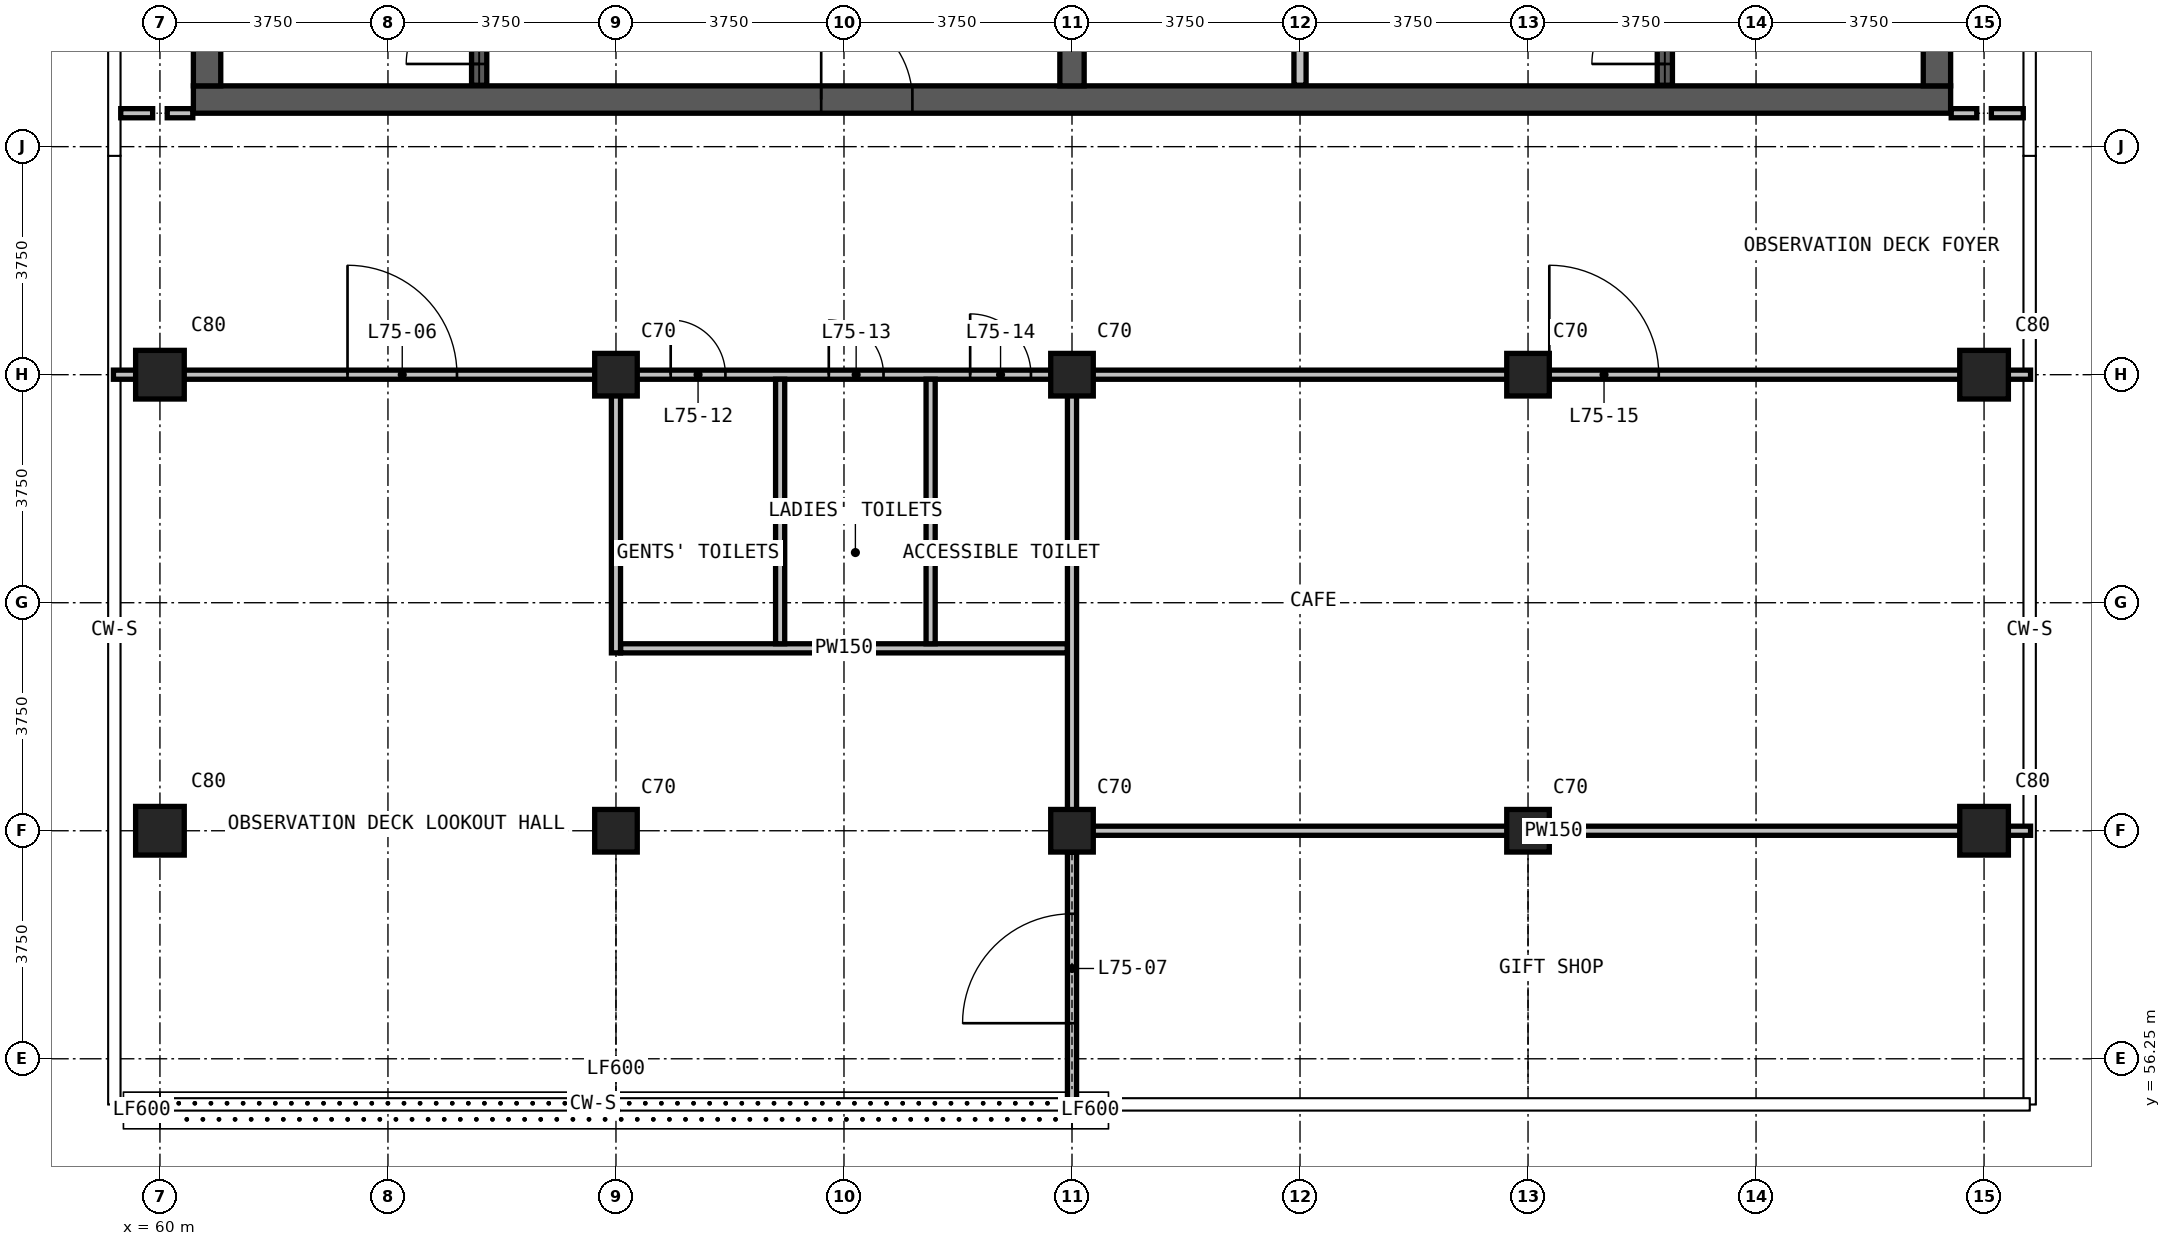
"""IFC4 building model, lengths in metres.
Left out: names, types, materials, properties, quantities, classifications, styles, units other than length and angle.
Written with IfcOpenShell. Run it as: python <this file> out.ifc"""

import sys

from ifc_helpers import new_model, si_unit, direction, frame, frame_2d, origin, origin_2d, place, context, subcontext, project, spatial, rectangle, extrude, element, fill, save


model = new_model("IFC4")
c1 = context("Model", 3, precision=1e-05, world=origin(), true_north=direction((0.0, 1.0)))
c2 = subcontext(c1, "Body", "Model", "MODEL_VIEW")
j1 = project(units=[si_unit("LENGTHUNIT", "METRE"), si_unit("PLANEANGLEUNIT", "RADIAN")], contexts=[c1])
p1 = place(None, origin())
s1 = spatial("IfcSite", under=j1, at=p1, CompositionType="ELEMENT")
p2 = place(p1, origin())
s2 = spatial("IfcBuilding", under=s1, at=p2, CompositionType="ELEMENT")
p3 = place(p2, frame((0.0, 0.0, 287.7)))
s3 = spatial("IfcBuildingStorey", under=s2, at=p3, CompositionType="ELEMENT", Elevation=287.7)
for number, where, z_axis, x_axis in (
    (1, (60.0, 60.0, 0.0), (0.0, 0.0, 1.0), (1.0, 0.0, 0.0)),
    (2, (60.0, 67.5, 0.0), (0.0, 0.0, 1.0), (1.0, 0.0, 0.0)),
):
    element("IfcColumn", number, at=place(p3, frame(where, z_axis=z_axis, x_axis=x_axis)), inside=s3, PredefinedType="COLUMN", context=c2, shape_type="SweptSolid", body=[
        extrude(rectangle(XDim=0.8, YDim=0.8, at=origin_2d()), origin(), (0.0, 0.0, 1.0), 5.0),
    ])
for number, where, z_axis, x_axis in (
    (3, (67.5, 60.0, 0.0), (0.0, 0.0, 1.0), (1.0, 0.0, 0.0)),
    (4, (67.5, 67.5, 0.0), (0.0, 0.0, 1.0), (1.0, 0.0, 0.0)),
    (5, (75.0, 60.0, 0.0), (0.0, 0.0, 1.0), (1.0, 0.0, 0.0)),
    (6, (75.0, 67.5, 0.0), (0.0, 0.0, 1.0), (1.0, 0.0, 0.0)),
    (7, (82.5, 60.0, 0.0), (0.0, 0.0, 1.0), (1.0, 0.0, 0.0)),
    (8, (82.5, 67.5, 0.0), (0.0, 0.0, 1.0), (1.0, 0.0, 0.0)),
):
    element("IfcColumn", number, at=place(p3, frame(where, z_axis=z_axis, x_axis=x_axis)), inside=s3, PredefinedType="COLUMN", context=c2, shape_type="SweptSolid", body=[
        extrude(rectangle(XDim=0.7, YDim=0.7, at=origin_2d()), origin(), (0.0, 0.0, 1.0), 5.0),
    ])
for number, where, z_axis, x_axis in (
    (9, (90.0, 60.0, 0.0), (0.0, 0.0, 1.0), (1.0, 0.0, 0.0)),
    (10, (90.0, 67.5, 0.0), (0.0, 0.0, 1.0), (1.0, 0.0, 0.0)),
):
    element("IfcColumn", number, at=place(p3, frame(where, z_axis=z_axis, x_axis=x_axis)), inside=s3, PredefinedType="COLUMN", context=c2, shape_type="SweptSolid", body=[
        extrude(rectangle(XDim=0.8, YDim=0.8, at=origin_2d()), origin(), (0.0, 0.0, 1.0), 5.0),
    ])
p4 = place(p3, frame((60.55, 72.025, 0.0), z_axis=(0.0, 0.0, 1.0), x_axis=(1.0, 0.0, 0.0)))
e11 = element("IfcWall", 11, at=p4, inside=s3, PredefinedType="SHEAR", context=c2, shape_type="SweptSolid", body=[
    extrude(rectangle(XDim=28.9, YDim=0.45, at=frame_2d((14.45, 0.0))), origin(), (0.0, 0.0, 1.0), 5.0),
])
p5 = place(p4, frame((10.325, 0.0, 0.0)))
e12 = element("IfcOpeningElement", 12, at=p5, cuts=e11, PredefinedType="OPENING", context=c2, shape_type="SweptSolid", body=[
    extrude(rectangle(XDim=1.5, YDim=2.2, at=frame_2d((0.75, 1.1))), frame((0.0, 0.235, 0.0), z_axis=(0.0, -1.0, 0.0), x_axis=(1.0, 0.0, 0.0)), (0.0, 0.0, 1.0), 0.47),
])
p6 = place(p3, frame((89.225, 72.25, 0.0), z_axis=(0.0, 0.0, 1.0), x_axis=(0.0, 1.0, 0.0)))
e13 = element("IfcWall", 13, at=p6, inside=s3, PredefinedType="SHEAR", context=c2, shape_type="SweptSolid", body=[
    extrude(rectangle(XDim=20.5, YDim=0.45, at=frame_2d((10.25, 0.0))), origin(), (0.0, 0.0, 1.0), 5.0),
])
p7 = place(p6, frame((7.875, 0.0, 0.0)))
e14 = element("IfcOpeningElement", 14, at=p7, cuts=e13, PredefinedType="OPENING", context=c2, shape_type="SweptSolid", body=[
    extrude(rectangle(XDim=1.5, YDim=2.2, at=frame_2d((0.75, 1.1))), frame((0.0, 0.235, 0.0), z_axis=(0.0, -1.0, 0.0), x_axis=(1.0, 0.0, 0.0)), (0.0, 0.0, 1.0), 0.47),
])
p8 = place(p3, frame((60.775, 92.75, 0.0), z_axis=(0.0, 0.0, 1.0), x_axis=(0.0, -1.0, 0.0)))
e15 = element("IfcWall", 15, at=p8, inside=s3, PredefinedType="SHEAR", context=c2, shape_type="SweptSolid", body=[
    extrude(rectangle(XDim=20.5, YDim=0.45, at=frame_2d((10.25, 0.0))), origin(), (0.0, 0.0, 1.0), 5.0),
])
p9 = place(p8, frame((8.025, 0.0, 0.0)))
e16 = element("IfcOpeningElement", 16, at=p9, cuts=e15, PredefinedType="OPENING", context=c2, shape_type="SweptSolid", body=[
    extrude(rectangle(XDim=1.2, YDim=2.2, at=frame_2d((0.6, 1.1))), frame((0.0, 0.235, 0.0), z_axis=(0.0, -1.0, 0.0), x_axis=(1.0, 0.0, 0.0)), (0.0, 0.0, 1.0), 0.47),
])
p10 = place(p3, frame((75.0, 72.25, 0.0), z_axis=(0.0, 0.0, 1.0), x_axis=(0.0, 1.0, 0.0)))
e17 = element("IfcWall", 17, at=p10, inside=s3, PredefinedType="SHEAR", context=c2, shape_type="SweptSolid", body=[
    extrude(rectangle(XDim=6.35, YDim=0.4, at=frame_2d((3.175, 0.0))), origin(), (0.0, 0.0, 1.0), 5.0),
])
p11 = place(p3, frame((78.75, 72.26, 0.0), z_axis=(0.0, 0.0, 1.0), x_axis=(0.0, 1.0, 0.0)))
e18 = element("IfcWall", 18, at=p11, inside=s3, PredefinedType="PARTITIONING", context=c2, shape_type="SweptSolid", body=[
    extrude(rectangle(XDim=10.24, YDim=0.2, at=frame_2d((5.12, 0.0))), origin(), (0.0, 0.0, 1.0), 4.65),
])
p12 = place(p3, frame((75.075, 60.0, 0.0), z_axis=(0.0, 0.0, 1.0), x_axis=(1.0, 0.0, 0.0)))
e19 = element("IfcWall", 19, at=p12, inside=s3, PredefinedType="PARTITIONING", context=c2, shape_type="SweptSolid", body=[
    extrude(rectangle(XDim=15.69, YDim=0.15, at=frame_2d((7.845, 0.0))), origin(), (0.0, 0.0, 1.0), 4.65),
])
p13 = place(p3, frame((67.575, 63.0, 0.0), z_axis=(0.0, 0.0, 1.0), x_axis=(1.0, 0.0, 0.0)))
e20 = element("IfcWall", 20, at=p13, inside=s3, PredefinedType="PARTITIONING", context=c2, shape_type="SweptSolid", body=[
    extrude(rectangle(XDim=7.35, YDim=0.15, at=frame_2d((3.675, 0.0))), origin(), (0.0, 0.0, 1.0), 4.65),
])
p14 = place(p3, frame((59.235, 67.5, 0.0), z_axis=(0.0, 0.0, 1.0), x_axis=(1.0, 0.0, 0.0)))
e21 = element("IfcWall", 21, at=p14, inside=s3, PredefinedType="PARTITIONING", context=c2, shape_type="SweptSolid", body=[
    extrude(rectangle(XDim=31.53, YDim=0.15, at=frame_2d((15.765, 0.0))), origin(), (0.0, 0.0, 1.0), 4.65),
])
p15 = place(p14, frame((3.85, 0.0, 0.0)))
e22 = element("IfcOpeningElement", 22, at=p15, cuts=e21, PredefinedType="OPENING", context=c2, shape_type="SweptSolid", body=[
    extrude(rectangle(XDim=1.8, YDim=2.2, at=frame_2d((0.9, 1.1))), frame((0.0, 0.085, 0.0), z_axis=(0.0, -1.0, 0.0), x_axis=(1.0, 0.0, 0.0)), (0.0, 0.0, 1.0), 0.17),
])
p16 = place(p14, frame((9.165, 0.0, 0.0)))
e23 = element("IfcOpeningElement", 23, at=p16, cuts=e21, PredefinedType="OPENING", context=c2, shape_type="SweptSolid", body=[
    extrude(rectangle(XDim=0.9, YDim=2.2, at=frame_2d((0.45, 1.1))), frame((0.0, 0.085, 0.0), z_axis=(0.0, -1.0, 0.0), x_axis=(1.0, 0.0, 0.0)), (0.0, 0.0, 1.0), 0.17),
])
p17 = place(p14, frame((11.765, 0.0, 0.0)))
e24 = element("IfcOpeningElement", 24, at=p17, cuts=e21, PredefinedType="OPENING", context=c2, shape_type="SweptSolid", body=[
    extrude(rectangle(XDim=0.9, YDim=2.2, at=frame_2d((0.45, 1.1))), frame((0.0, 0.085, 0.0), z_axis=(0.0, -1.0, 0.0), x_axis=(1.0, 0.0, 0.0)), (0.0, 0.0, 1.0), 0.17),
])
p18 = place(p14, frame((14.09, 0.0, 0.0)))
e25 = element("IfcOpeningElement", 25, at=p18, cuts=e21, PredefinedType="OPENING", context=c2, shape_type="SweptSolid", body=[
    extrude(rectangle(XDim=1.0, YDim=2.2, at=frame_2d((0.5, 1.1))), frame((0.0, 0.085, 0.0), z_axis=(0.0, -1.0, 0.0), x_axis=(1.0, 0.0, 0.0)), (0.0, 0.0, 1.0), 0.17),
])
p19 = place(p14, frame((23.615, 0.0, 0.0)))
e26 = element("IfcOpeningElement", 26, at=p19, cuts=e21, PredefinedType="OPENING", context=c2, shape_type="SweptSolid", body=[
    extrude(rectangle(XDim=1.8, YDim=2.2, at=frame_2d((0.9, 1.1))), frame((0.0, 0.085, 0.0), z_axis=(0.0, -1.0, 0.0), x_axis=(1.0, 0.0, 0.0)), (0.0, 0.0, 1.0), 0.17),
])
p20 = place(p3, frame((59.355, 71.8, 0.0), z_axis=(0.0, 0.0, 1.0), x_axis=(1.0, 0.0, 0.0)))
e27 = element("IfcWall", 27, at=p20, inside=s3, PredefinedType="PARTITIONING", context=c2, shape_type="SweptSolid", body=[
    extrude(rectangle(XDim=0.525, YDim=0.15, at=frame_2d((0.262, 0.0))), origin(), (0.0, 0.0, 1.0), 4.65),
])
for number, where, z_axis, x_axis in (
    (28, (60.12, 71.8, 0.0), (0.0, 0.0, 1.0), (1.0, 0.0, 0.0)),
    (29, (89.46, 71.8, 0.0), (0.0, 0.0, 1.0), (1.0, 0.0, 0.0)),
):
    element("IfcWall", number, at=place(p3, frame(where, z_axis=z_axis, x_axis=x_axis)), inside=s3, PredefinedType="PARTITIONING", context=c2, shape_type="SweptSolid", body=[
        extrude(rectangle(XDim=0.42, YDim=0.15, at=frame_2d((0.21, 0.0))), origin(), (0.0, 0.0, 1.0), 4.65),
    ])
p21 = place(p3, frame((90.12, 71.8, 0.0), z_axis=(0.0, 0.0, 1.0), x_axis=(1.0, 0.0, 0.0)))
e30 = element("IfcWall", 30, at=p21, inside=s3, PredefinedType="PARTITIONING", context=c2, shape_type="SweptSolid", body=[
    extrude(rectangle(XDim=0.525, YDim=0.15, at=frame_2d((0.262, 0.0))), origin(), (0.0, 0.0, 1.0), 4.65),
])
p22 = place(p3, frame((67.5, 62.925, 0.0), z_axis=(0.0, 0.0, 1.0), x_axis=(0.0, 1.0, 0.0)))
e31 = element("IfcWall", 31, at=p22, inside=s3, PredefinedType="PARTITIONING", context=c2, shape_type="SweptSolid", body=[
    extrude(rectangle(XDim=4.5, YDim=0.15, at=frame_2d((2.25, 0.0))), origin(), (0.0, 0.0, 1.0), 4.65),
])
for number, where, z_axis, x_axis in (
    (32, (70.2, 63.075, 0.0), (0.0, 0.0, 1.0), (0.0, 1.0, 0.0)),
    (33, (72.675, 63.075, 0.0), (0.0, 0.0, 1.0), (0.0, 1.0, 0.0)),
):
    element("IfcWall", number, at=place(p3, frame(where, z_axis=z_axis, x_axis=x_axis)), inside=s3, PredefinedType="PARTITIONING", context=c2, shape_type="SweptSolid", body=[
        extrude(rectangle(XDim=4.35, YDim=0.15, at=frame_2d((2.175, 0.0))), origin(), (0.0, 0.0, 1.0), 4.65),
    ])
p23 = place(p3, frame((75.0, 55.485, 0.0), z_axis=(0.0, 0.0, 1.0), x_axis=(0.0, 1.0, 0.0)))
e34 = element("IfcWall", 34, at=p23, inside=s3, PredefinedType="PARTITIONING", context=c2, shape_type="SweptSolid", body=[
    extrude(rectangle(XDim=4.165, YDim=0.15, at=frame_2d((2.083, 0.0))), origin(), (0.0, 0.0, 1.0), 3.85),
])
p24 = place(p23, frame((1.35, 0.0, 0.0)))
e35 = element("IfcOpeningElement", 35, at=p24, cuts=e34, PredefinedType="OPENING", context=c2, shape_type="SweptSolid", body=[
    extrude(rectangle(XDim=1.8, YDim=2.2, at=frame_2d((0.9, 1.1))), frame((0.0, 0.085, 0.0), z_axis=(0.0, -1.0, 0.0), x_axis=(1.0, 0.0, 0.0)), (0.0, 0.0, 1.0), 0.17),
])
p25 = place(p3, frame((75.0, 59.65, 0.0), z_axis=(0.0, 0.0, 1.0), x_axis=(0.0, 1.0, 0.0)))
e36 = element("IfcWall", 36, at=p25, inside=s3, PredefinedType="PARTITIONING", context=c2, shape_type="SweptSolid", body=[
    extrude(rectangle(XDim=7.775, YDim=0.15, at=frame_2d((3.888, 0.0))), origin(), (0.0, 0.0, 1.0), 4.65),
])
p26 = place(p3, frame((65.25, 72.26, 0.0), z_axis=(0.0, 0.0, 1.0), x_axis=(0.0, 1.0, 0.0)))
e37 = element("IfcWall", 37, at=p26, inside=s3, PredefinedType="PARTITIONING", context=c2, shape_type="SweptSolid", body=[
    extrude(rectangle(XDim=5.99, YDim=0.25, at=frame_2d((2.995, 0.0))), origin(), (0.0, 0.0, 1.0), 4.65),
])
p27 = place(p26, frame((0.35, 0.0, 0.0)))
e38 = element("IfcOpeningElement", 38, at=p27, cuts=e37, PredefinedType="OPENING", context=c2, shape_type="SweptSolid", body=[
    extrude(rectangle(XDim=1.2, YDim=2.2, at=frame_2d((0.6, 1.1))), frame((0.0, 0.135, 0.0), z_axis=(0.0, -1.0, 0.0), x_axis=(1.0, 0.0, 0.0)), (0.0, 0.0, 1.0), 0.27),
])
p28 = place(p3, frame((84.75, 72.26, 0.0), z_axis=(0.0, 0.0, 1.0), x_axis=(0.0, 1.0, 0.0)))
e39 = element("IfcWall", 39, at=p28, inside=s3, PredefinedType="PARTITIONING", context=c2, shape_type="SweptSolid", body=[
    extrude(rectangle(XDim=5.99, YDim=0.25, at=frame_2d((2.995, 0.0))), origin(), (0.0, 0.0, 1.0), 4.65),
])
p29 = place(p28, frame((0.35, 0.0, 0.0)))
e40 = element("IfcOpeningElement", 40, at=p29, cuts=e39, PredefinedType="OPENING", context=c2, shape_type="SweptSolid", body=[
    extrude(rectangle(XDim=1.2, YDim=2.2, at=frame_2d((0.6, 1.1))), frame((0.0, 0.135, 0.0), z_axis=(0.0, -1.0, 0.0), x_axis=(1.0, 0.0, 0.0)), (0.0, 0.0, 1.0), 0.27),
])
p30 = place(p27, origin())
e41 = element("IfcDoor", 41, at=p30, inside=s3, OperationType="SINGLE_SWING_LEFT", PredefinedType="DOOR", context=c2, shape_type="SweptSolid", body=[
    extrude(rectangle(XDim=1.2, YDim=2.2, at=frame_2d((0.6, 1.1))), frame((0.0, 0.025, 0.0), z_axis=(0.0, -1.0, 0.0), x_axis=(1.0, 0.0, 0.0)), (0.0, 0.0, 1.0), 0.05),
])
fill(e38, e41)
p31 = place(p29, origin())
e42 = element("IfcDoor", 42, at=p31, inside=s3, OperationType="SINGLE_SWING_LEFT", PredefinedType="DOOR", context=c2, shape_type="SweptSolid", body=[
    extrude(rectangle(XDim=1.2, YDim=2.2, at=frame_2d((0.6, 1.1))), frame((0.0, 0.025, 0.0), z_axis=(0.0, -1.0, 0.0), x_axis=(1.0, 0.0, 0.0)), (0.0, 0.0, 1.0), 0.05),
])
fill(e40, e42)
p32 = place(p15, origin())
e43 = element("IfcDoor", 43, at=p32, inside=s3, OperationType="DOUBLE_DOOR_SINGLE_SWING", PredefinedType="DOOR", context=c2, shape_type="SweptSolid", body=[
    extrude(rectangle(XDim=1.8, YDim=2.2, at=frame_2d((0.9, 1.1))), frame((0.0, 0.025, 0.0), z_axis=(0.0, -1.0, 0.0), x_axis=(1.0, 0.0, 0.0)), (0.0, 0.0, 1.0), 0.05),
])
fill(e22, e43)
p33 = place(p24, origin())
e44 = element("IfcDoor", 44, at=p33, inside=s3, OperationType="DOUBLE_DOOR_SINGLE_SWING", PredefinedType="DOOR", context=c2, shape_type="SweptSolid", body=[
    extrude(rectangle(XDim=1.8, YDim=2.2, at=frame_2d((0.9, 1.1))), frame((0.0, 0.025, 0.0), z_axis=(0.0, -1.0, 0.0), x_axis=(1.0, 0.0, 0.0)), (0.0, 0.0, 1.0), 0.05),
])
fill(e35, e44)
p34 = place(p5, origin())
e45 = element("IfcDoor", 45, at=p34, inside=s3, OperationType="DOUBLE_DOOR_SINGLE_SWING", PredefinedType="DOOR", context=c2, shape_type="SweptSolid", body=[
    extrude(rectangle(XDim=1.5, YDim=2.2, at=frame_2d((0.75, 1.1))), frame((0.0, 0.025, 0.0), z_axis=(0.0, -1.0, 0.0), x_axis=(1.0, 0.0, 0.0)), (0.0, 0.0, 1.0), 0.05),
])
fill(e12, e45)
p35 = place(p16, origin())
e46 = element("IfcDoor", 46, at=p35, inside=s3, OperationType="SINGLE_SWING_RIGHT", PredefinedType="DOOR", context=c2, shape_type="SweptSolid", body=[
    extrude(rectangle(XDim=0.9, YDim=2.2, at=frame_2d((0.45, 1.1))), frame((0.0, 0.025, 0.0), z_axis=(0.0, -1.0, 0.0), x_axis=(1.0, 0.0, 0.0)), (0.0, 0.0, 1.0), 0.05),
])
fill(e23, e46)
p36 = place(p17, origin())
e47 = element("IfcDoor", 47, at=p36, inside=s3, OperationType="SINGLE_SWING_LEFT", PredefinedType="DOOR", context=c2, shape_type="SweptSolid", body=[
    extrude(rectangle(XDim=0.9, YDim=2.2, at=frame_2d((0.45, 1.1))), frame((0.0, 0.025, 0.0), z_axis=(0.0, -1.0, 0.0), x_axis=(1.0, 0.0, 0.0)), (0.0, 0.0, 1.0), 0.05),
])
fill(e24, e47)
p37 = place(p18, origin())
e48 = element("IfcDoor", 48, at=p37, inside=s3, OperationType="SINGLE_SWING_RIGHT", PredefinedType="DOOR", context=c2, shape_type="SweptSolid", body=[
    extrude(rectangle(XDim=1.0, YDim=2.2, at=frame_2d((0.5, 1.1))), frame((0.0, 0.025, 0.0), z_axis=(0.0, -1.0, 0.0), x_axis=(1.0, 0.0, 0.0)), (0.0, 0.0, 1.0), 0.05),
])
fill(e25, e48)
p38 = place(p19, origin())
e49 = element("IfcDoor", 49, at=p38, inside=s3, OperationType="DOUBLE_DOOR_SINGLE_SWING", PredefinedType="DOOR", context=c2, shape_type="SweptSolid", body=[
    extrude(rectangle(XDim=1.8, YDim=2.2, at=frame_2d((0.9, 1.1))), frame((0.0, 0.025, 0.0), z_axis=(0.0, -1.0, 0.0), x_axis=(1.0, 0.0, 0.0)), (0.0, 0.0, 1.0), 0.05),
])
fill(e26, e49)
save(model, sys.argv[1])
